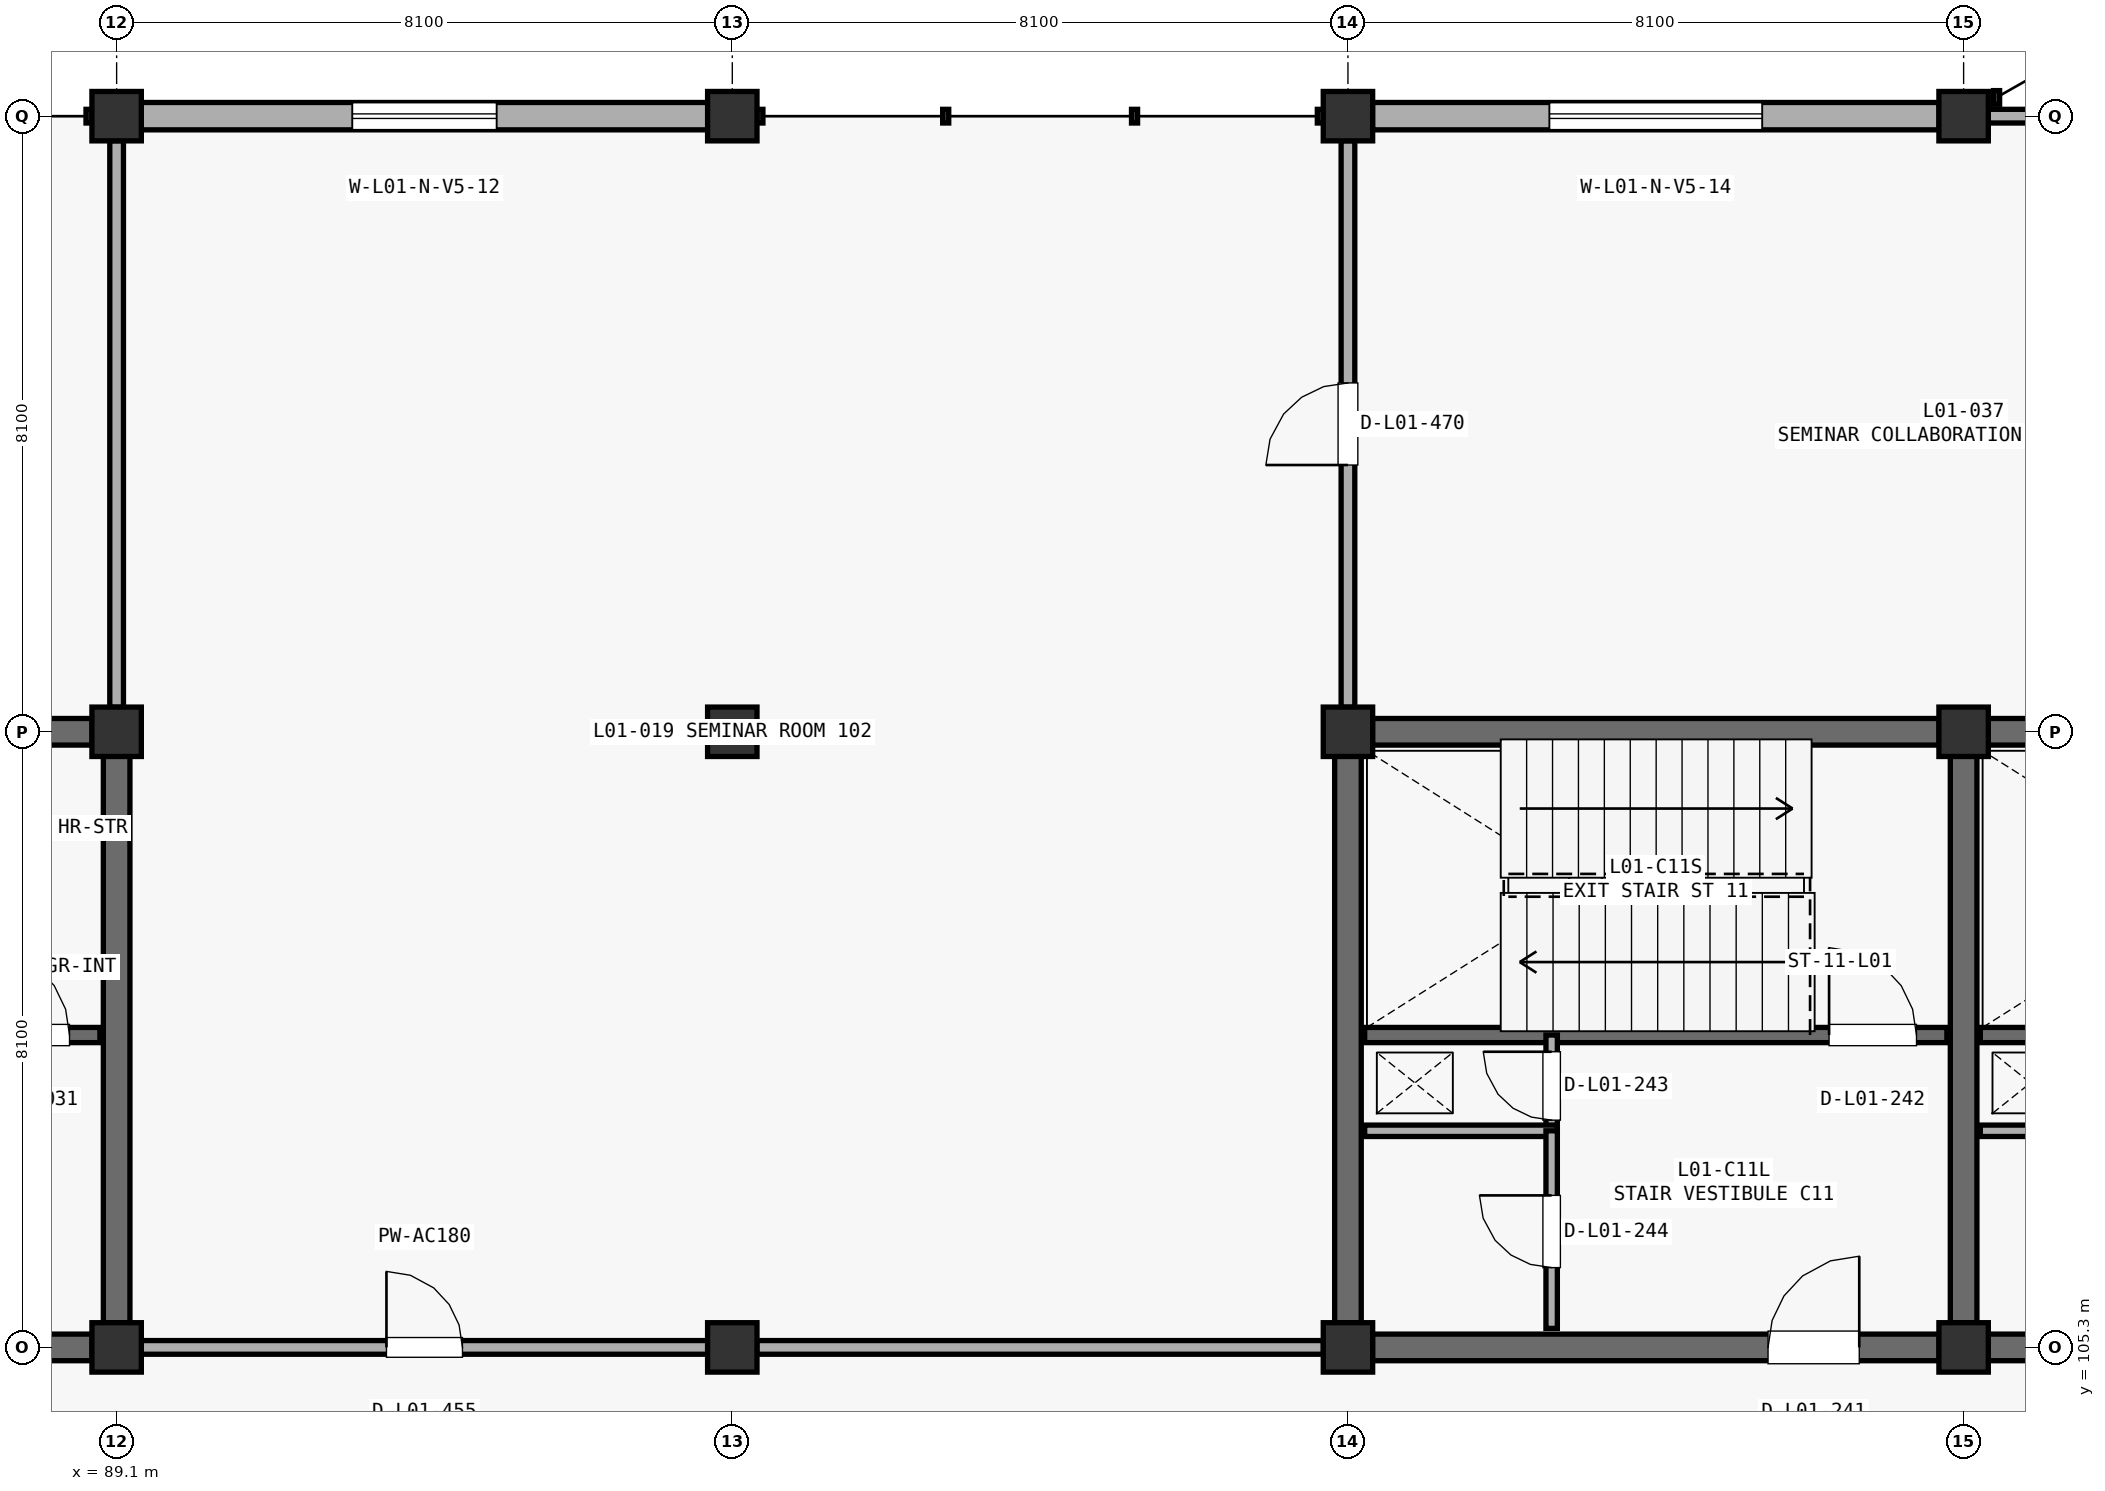
"""IFC4 building model, lengths in metres.
Left out: names, types, materials, properties, quantities, classifications, styles, units other than length and angle.
Written with IfcOpenShell. Run it as: python <this file> out.ifc"""

import sys

from ifc_helpers import new_model, si_unit, direction, frame, frame_2d, origin, origin_2d, place, context, subcontext, project, spatial, rectangle, extrude, element, fill, save


model = new_model("IFC4")
c1 = context("Model", 3, precision=1e-05, world=origin(), true_north=direction((0.0, 1.0)))
c2 = subcontext(c1, "Body", "Model", "MODEL_VIEW")
j1 = project(units=[si_unit("LENGTHUNIT", "METRE"), si_unit("PLANEANGLEUNIT", "RADIAN")], contexts=[c1])
p1 = place(None, origin())
s1 = spatial("IfcSite", under=j1, at=p1, CompositionType="ELEMENT")
p2 = place(p1, origin())
s2 = spatial("IfcBuilding", under=s1, at=p2, CompositionType="ELEMENT")
p3 = place(p2, frame((0.0, 0.0, 5.1)))
s3 = spatial("IfcBuildingStorey", under=s2, at=p3, CompositionType="ELEMENT", Elevation=5.1)
for number, where, z_axis, x_axis in (
    (1, (89.1, 105.3, 0.0), (0.0, 0.0, 1.0), (1.0, 0.0, 0.0)),
    (2, (89.1, 113.4, 0.0), (0.0, 0.0, 1.0), (1.0, 0.0, 0.0)),
    (3, (89.1, 121.5, 0.0), (0.0, 0.0, 1.0), (1.0, 0.0, 0.0)),
    (4, (97.2, 105.3, 0.0), (0.0, 0.0, 1.0), (1.0, 0.0, 0.0)),
    (5, (97.2, 113.4, 0.0), (0.0, 0.0, 1.0), (1.0, 0.0, 0.0)),
    (6, (97.2, 121.5, 0.0), (0.0, 0.0, 1.0), (1.0, 0.0, 0.0)),
    (7, (105.3, 105.3, 0.0), (0.0, 0.0, 1.0), (1.0, 0.0, 0.0)),
    (8, (105.3, 113.4, 0.0), (0.0, 0.0, 1.0), (1.0, 0.0, 0.0)),
    (9, (105.3, 121.5, 0.0), (0.0, 0.0, 1.0), (1.0, 0.0, 0.0)),
    (10, (113.4, 105.3, 0.0), (0.0, 0.0, 1.0), (1.0, 0.0, 0.0)),
    (11, (113.4, 113.4, 0.0), (0.0, 0.0, 1.0), (1.0, 0.0, 0.0)),
    (12, (113.4, 121.5, 0.0), (0.0, 0.0, 1.0), (1.0, 0.0, 0.0)),
):
    element("IfcColumn", number, at=place(p3, frame(where, z_axis=z_axis, x_axis=x_axis)), inside=s3, PredefinedType="COLUMN", context=c2, shape_type="SweptSolid", body=[
        extrude(rectangle(XDim=0.65, YDim=0.65, at=origin_2d()), origin(), (0.0, 0.0, 1.0), 4.59),
    ])
p4 = place(p3, frame((89.423, 121.5, 0.0), z_axis=(0.0, 0.0, 1.0), x_axis=(1.0, 0.0, 0.0)))
e13 = element("IfcWall", 13, at=p4, inside=s3, PredefinedType="STANDARD", context=c2, shape_type="SweptSolid", body=[
    extrude(rectangle(XDim=7.454, YDim=0.36, at=frame_2d((3.727, 0.0))), origin(), (0.0, 0.0, 1.0), 3.402),
])
p5 = place(p4, frame((2.777, 0.0, 0.85)))
e14 = element("IfcOpeningElement", 14, at=p5, cuts=e13, PredefinedType="OPENING", context=c2, shape_type="SweptSolid", body=[
    extrude(rectangle(XDim=1.9, YDim=1.85, at=frame_2d((0.95, 0.925))), frame((0.0, 0.19, 0.0), z_axis=(0.0, -1.0, 0.0), x_axis=(1.0, 0.0, 0.0)), (0.0, 0.0, 1.0), 0.38),
])
p6 = place(p3, frame((105.623, 121.5, 0.0), z_axis=(0.0, 0.0, 1.0), x_axis=(1.0, 0.0, 0.0)))
e15 = element("IfcWall", 15, at=p6, inside=s3, PredefinedType="STANDARD", context=c2, shape_type="SweptSolid", body=[
    extrude(rectangle(XDim=7.454, YDim=0.36, at=frame_2d((3.727, 0.0))), origin(), (0.0, 0.0, 1.0), 3.502),
])
p7 = place(p6, frame((2.327, 0.0, 0.85)))
e16 = element("IfcOpeningElement", 16, at=p7, cuts=e15, PredefinedType="OPENING", context=c2, shape_type="SweptSolid", body=[
    extrude(rectangle(XDim=2.8, YDim=1.85, at=frame_2d((1.4, 0.925))), frame((0.0, 0.19, 0.0), z_axis=(0.0, -1.0, 0.0), x_axis=(1.0, 0.0, 0.0)), (0.0, 0.0, 1.0), 0.38),
])
p8 = place(p3, frame((81.323, 113.4, 0.0), z_axis=(0.0, 0.0, 1.0), x_axis=(1.0, 0.0, 0.0)))
e17 = element("IfcWall", 17, at=p8, inside=s3, PredefinedType="SHEAR", context=c2, shape_type="SweptSolid", body=[
    extrude(rectangle(XDim=7.454, YDim=0.35, at=frame_2d((3.727, 0.0))), origin(), (0.0, 0.0, 1.0), 4.252),
])
p9 = place(p3, frame((89.1, 105.623, 0.0), z_axis=(0.0, 0.0, 1.0), x_axis=(0.0, 1.0, 0.0)))
e18 = element("IfcWall", 18, at=p9, inside=s3, PredefinedType="SHEAR", context=c2, shape_type="SweptSolid", body=[
    extrude(rectangle(XDim=7.454, YDim=0.35, at=frame_2d((3.727, 0.0))), origin(), (0.0, 0.0, 1.0), 4.252),
])
p10 = place(p3, frame((81.323, 105.3, 0.0), z_axis=(0.0, 0.0, 1.0), x_axis=(1.0, 0.0, 0.0)))
e19 = element("IfcWall", 19, at=p10, inside=s3, PredefinedType="SHEAR", context=c2, shape_type="SweptSolid", body=[
    extrude(rectangle(XDim=7.454, YDim=0.35, at=frame_2d((3.727, 0.0))), origin(), (0.0, 0.0, 1.0), 4.252),
])
p11 = place(p10, frame((5.204, 0.0, 0.0)))
e20 = element("IfcOpeningElement", 20, at=p11, cuts=e19, PredefinedType="OPENING", context=c2, shape_type="SweptSolid", body=[
    extrude(rectangle(XDim=1.2, YDim=2.2, at=frame_2d((0.6, 1.1))), frame((0.0, 0.185, 0.0), z_axis=(0.0, -1.0, 0.0), x_axis=(1.0, 0.0, 0.0)), (0.0, 0.0, 1.0), 0.37),
])
p12 = place(p3, frame((81.22, 109.41, 0.0), z_axis=(0.0, 0.0, 1.0), x_axis=(1.0, 0.0, 0.0)))
e21 = element("IfcWall", 21, at=p12, inside=s3, PredefinedType="SHEAR", context=c2, shape_type="SweptSolid", body=[
    extrude(rectangle(XDim=7.66, YDim=0.2, at=frame_2d((3.83, 0.0))), origin(), (0.0, 0.0, 1.0), 4.252),
])
p13 = place(p12, frame((6.11, 0.0, 0.0)))
e22 = element("IfcOpeningElement", 22, at=p13, cuts=e21, PredefinedType="OPENING", context=c2, shape_type="SweptSolid", body=[
    extrude(rectangle(XDim=1.15, YDim=2.2, at=frame_2d((0.575, 1.1))), frame((0.0, 0.11, 0.0), z_axis=(0.0, -1.0, 0.0), x_axis=(1.0, 0.0, 0.0)), (0.0, 0.0, 1.0), 0.22),
])
p14 = place(p3, frame((113.723, 113.4, 0.0), z_axis=(0.0, 0.0, 1.0), x_axis=(1.0, 0.0, 0.0)))
e23 = element("IfcWall", 23, at=p14, inside=s3, PredefinedType="SHEAR", context=c2, shape_type="SweptSolid", body=[
    extrude(rectangle(XDim=7.454, YDim=0.35, at=frame_2d((3.727, 0.0))), origin(), (0.0, 0.0, 1.0), 4.252),
])
p15 = place(p3, frame((113.4, 105.623, 0.0), z_axis=(0.0, 0.0, 1.0), x_axis=(0.0, 1.0, 0.0)))
e24 = element("IfcWall", 24, at=p15, inside=s3, PredefinedType="SHEAR", context=c2, shape_type="SweptSolid", body=[
    extrude(rectangle(XDim=7.454, YDim=0.35, at=frame_2d((3.727, 0.0))), origin(), (0.0, 0.0, 1.0), 4.252),
])
p16 = place(p3, frame((113.723, 105.3, 0.0), z_axis=(0.0, 0.0, 1.0), x_axis=(1.0, 0.0, 0.0)))
e25 = element("IfcWall", 25, at=p16, inside=s3, PredefinedType="SHEAR", context=c2, shape_type="SweptSolid", body=[
    extrude(rectangle(XDim=7.454, YDim=0.35, at=frame_2d((3.727, 0.0))), origin(), (0.0, 0.0, 1.0), 4.252),
])
p17 = place(p16, frame((5.204, 0.0, 0.0)))
e26 = element("IfcOpeningElement", 26, at=p17, cuts=e25, PredefinedType="OPENING", context=c2, shape_type="SweptSolid", body=[
    extrude(rectangle(XDim=1.2, YDim=2.2, at=frame_2d((0.6, 1.1))), frame((0.0, 0.185, 0.0), z_axis=(0.0, -1.0, 0.0), x_axis=(1.0, 0.0, 0.0)), (0.0, 0.0, 1.0), 0.37),
])
p18 = place(p3, frame((113.62, 109.41, 0.0), z_axis=(0.0, 0.0, 1.0), x_axis=(1.0, 0.0, 0.0)))
e27 = element("IfcWall", 27, at=p18, inside=s3, PredefinedType="SHEAR", context=c2, shape_type="SweptSolid", body=[
    extrude(rectangle(XDim=7.66, YDim=0.2, at=frame_2d((3.83, 0.0))), origin(), (0.0, 0.0, 1.0), 4.252),
])
p19 = place(p18, frame((6.11, 0.0, 0.0)))
e28 = element("IfcOpeningElement", 28, at=p19, cuts=e27, PredefinedType="OPENING", context=c2, shape_type="SweptSolid", body=[
    extrude(rectangle(XDim=1.15, YDim=2.2, at=frame_2d((0.575, 1.1))), frame((0.0, 0.11, 0.0), z_axis=(0.0, -1.0, 0.0), x_axis=(1.0, 0.0, 0.0)), (0.0, 0.0, 1.0), 0.22),
])
p20 = place(p3, frame((113.62, 108.15, 0.0), z_axis=(0.0, 0.0, 1.0), x_axis=(1.0, 0.0, 0.0)))
e29 = element("IfcWall", 29, at=p20, inside=s3, PredefinedType="PARTITIONING", context=c2, shape_type="SweptSolid", body=[
    extrude(rectangle(XDim=2.53, YDim=0.15, at=frame_2d((1.265, 0.0))), origin(), (0.0, 0.0, 1.0), 4.252),
])
for number, where, z_axis, x_axis in (
    (30, (105.623, 113.4, 0.0), (0.0, 0.0, 1.0), (1.0, 0.0, 0.0)),
    (31, (105.3, 105.623, 0.0), (0.0, 0.0, 1.0), (0.0, 1.0, 0.0)),
):
    element("IfcWall", number, at=place(p3, frame(where, z_axis=z_axis, x_axis=x_axis)), inside=s3, PredefinedType="SHEAR", context=c2, shape_type="SweptSolid", body=[
        extrude(rectangle(XDim=7.454, YDim=0.35, at=frame_2d((3.727, 0.0))), origin(), (0.0, 0.0, 1.0), 4.252),
    ])
p21 = place(p3, frame((105.623, 105.3, 0.0), z_axis=(0.0, 0.0, 1.0), x_axis=(1.0, 0.0, 0.0)))
e32 = element("IfcWall", 32, at=p21, inside=s3, PredefinedType="SHEAR", context=c2, shape_type="SweptSolid", body=[
    extrude(rectangle(XDim=7.454, YDim=0.35, at=frame_2d((3.727, 0.0))), origin(), (0.0, 0.0, 1.0), 4.252),
])
p22 = place(p21, frame((5.204, 0.0, 0.0)))
e33 = element("IfcOpeningElement", 33, at=p22, cuts=e32, PredefinedType="OPENING", context=c2, shape_type="SweptSolid", body=[
    extrude(rectangle(XDim=1.2, YDim=2.2, at=frame_2d((0.6, 1.1))), frame((0.0, 0.185, 0.0), z_axis=(0.0, -1.0, 0.0), x_axis=(1.0, 0.0, 0.0)), (0.0, 0.0, 1.0), 0.37),
])
p23 = place(p3, frame((105.52, 109.41, 0.0), z_axis=(0.0, 0.0, 1.0), x_axis=(1.0, 0.0, 0.0)))
e34 = element("IfcWall", 34, at=p23, inside=s3, PredefinedType="SHEAR", context=c2, shape_type="SweptSolid", body=[
    extrude(rectangle(XDim=7.66, YDim=0.2, at=frame_2d((3.83, 0.0))), origin(), (0.0, 0.0, 1.0), 4.252),
])
p24 = place(p23, frame((6.11, 0.0, 0.0)))
e35 = element("IfcOpeningElement", 35, at=p24, cuts=e34, PredefinedType="OPENING", context=c2, shape_type="SweptSolid", body=[
    extrude(rectangle(XDim=1.15, YDim=2.2, at=frame_2d((0.575, 1.1))), frame((0.0, 0.11, 0.0), z_axis=(0.0, -1.0, 0.0), x_axis=(1.0, 0.0, 0.0)), (0.0, 0.0, 1.0), 0.22),
])
p25 = place(p3, frame((107.98, 108.15, 0.0), z_axis=(0.0, 0.0, 1.0), x_axis=(0.0, 1.0, 0.0)))
e36 = element("IfcWall", 36, at=p25, inside=s3, PredefinedType="PARTITIONING", context=c2, shape_type="SweptSolid", body=[
    extrude(rectangle(XDim=1.26, YDim=0.15, at=frame_2d((0.63, 0.0))), origin(), (0.0, 0.0, 1.0), 4.252),
])
p26 = place(p25, frame((0.14, 0.0, 0.0)))
e37 = element("IfcOpeningElement", 37, at=p26, cuts=e36, PredefinedType="OPENING", context=c2, shape_type="SweptSolid", body=[
    extrude(rectangle(XDim=0.9, YDim=2.15, at=frame_2d((0.45, 1.075))), frame((0.0, 0.085, 0.0), z_axis=(0.0, -1.0, 0.0), x_axis=(1.0, 0.0, 0.0)), (0.0, 0.0, 1.0), 0.17),
])
p27 = place(p3, frame((105.52, 108.15, 0.0), z_axis=(0.0, 0.0, 1.0), x_axis=(1.0, 0.0, 0.0)))
e38 = element("IfcWall", 38, at=p27, inside=s3, PredefinedType="PARTITIONING", context=c2, shape_type="SweptSolid", body=[
    extrude(rectangle(XDim=2.53, YDim=0.15, at=frame_2d((1.265, 0.0))), origin(), (0.0, 0.0, 1.0), 4.252),
])
p28 = place(p3, frame((107.98, 105.55, 0.0), z_axis=(0.0, 0.0, 1.0), x_axis=(0.0, 1.0, 0.0)))
e39 = element("IfcWall", 39, at=p28, inside=s3, PredefinedType="PARTITIONING", context=c2, shape_type="SweptSolid", body=[
    extrude(rectangle(XDim=2.6, YDim=0.15, at=frame_2d((1.3, 0.0))), origin(), (0.0, 0.0, 1.0), 4.252),
])
p29 = place(p28, frame((0.8, 0.0, 0.0)))
e40 = element("IfcOpeningElement", 40, at=p29, cuts=e39, PredefinedType="OPENING", context=c2, shape_type="SweptSolid", body=[
    extrude(rectangle(XDim=0.95, YDim=2.15, at=frame_2d((0.475, 1.075))), frame((0.0, 0.085, 0.0), z_axis=(0.0, -1.0, 0.0), x_axis=(1.0, 0.0, 0.0)), (0.0, 0.0, 1.0), 0.17),
])
p30 = place(p3, frame((89.423, 105.3, 0.0), z_axis=(0.0, 0.0, 1.0), x_axis=(1.0, 0.0, 0.0)))
e41 = element("IfcWall", 41, at=p30, inside=s3, PredefinedType="PARTITIONING", context=c2, shape_type="SweptSolid", body=[
    extrude(rectangle(XDim=7.454, YDim=0.18, at=frame_2d((3.727, 0.0))), origin(), (0.0, 0.0, 1.0), 3.602),
])
p31 = place(p30, frame((3.227, 0.0, 0.0)))
e42 = element("IfcOpeningElement", 42, at=p31, cuts=e41, PredefinedType="OPENING", context=c2, shape_type="SweptSolid", body=[
    extrude(rectangle(XDim=1.0, YDim=2.15, at=frame_2d((0.5, 1.075))), frame((0.0, 0.1, 0.0), z_axis=(0.0, -1.0, 0.0), x_axis=(1.0, 0.0, 0.0)), (0.0, 0.0, 1.0), 0.2),
])
p32 = place(p3, frame((97.523, 105.3, 0.0), z_axis=(0.0, 0.0, 1.0), x_axis=(1.0, 0.0, 0.0)))
e43 = element("IfcWall", 43, at=p32, inside=s3, PredefinedType="PARTITIONING", context=c2, shape_type="SweptSolid", body=[
    extrude(rectangle(XDim=7.454, YDim=0.18, at=frame_2d((3.727, 0.0))), origin(), (0.0, 0.0, 1.0), 3.652),
])
p33 = place(p3, frame((105.3, 113.723, 0.0), z_axis=(0.0, 0.0, 1.0), x_axis=(0.0, 1.0, 0.0)))
e44 = element("IfcWall", 44, at=p33, inside=s3, PredefinedType="PARTITIONING", context=c2, shape_type="SweptSolid", body=[
    extrude(rectangle(XDim=7.454, YDim=0.18, at=frame_2d((3.727, 0.0))), origin(), (0.0, 0.0, 1.0), 3.652),
])
p34 = place(p33, frame((3.187, 0.0, 0.0)))
e45 = element("IfcOpeningElement", 45, at=p34, cuts=e44, PredefinedType="OPENING", context=c2, shape_type="SweptSolid", body=[
    extrude(rectangle(XDim=1.08, YDim=2.15, at=frame_2d((0.54, 1.075))), frame((0.0, 0.1, 0.0), z_axis=(0.0, -1.0, 0.0), x_axis=(1.0, 0.0, 0.0)), (0.0, 0.0, 1.0), 0.2),
])
p35 = place(p3, frame((89.1, 113.723, 0.0), z_axis=(0.0, 0.0, 1.0), x_axis=(0.0, 1.0, 0.0)))
e46 = element("IfcWall", 46, at=p35, inside=s3, PredefinedType="PARTITIONING", context=c2, shape_type="SweptSolid", body=[
    extrude(rectangle(XDim=7.454, YDim=0.18, at=frame_2d((3.727, 0.0))), origin(), (0.0, 0.0, 1.0), 3.402),
])
p36 = place(p3, frame((113.723, 121.5, 0.0), z_axis=(0.0, 0.0, 1.0), x_axis=(1.0, 0.0, 0.0)))
e47 = element("IfcWall", 47, at=p36, inside=s3, PredefinedType="PARTITIONING", context=c2, shape_type="SweptSolid", body=[
    extrude(rectangle(XDim=7.454, YDim=0.18, at=frame_2d((3.727, 0.0))), origin(), (0.0, 0.0, 1.0), 3.602),
])
p37 = place(p5, origin())
e48 = element("IfcWindow", 48, at=p37, inside=s3, PartitioningType="SINGLE_PANEL", PredefinedType="WINDOW", context=c2, shape_type="SweptSolid", body=[
    extrude(rectangle(XDim=1.9, YDim=1.85, at=frame_2d((0.95, 0.925))), frame((0.0, 0.03, 0.0), z_axis=(0.0, -1.0, 0.0), x_axis=(1.0, 0.0, 0.0)), (0.0, 0.0, 1.0), 0.06),
])
fill(e14, e48)
p38 = place(p7, origin())
e49 = element("IfcWindow", 49, at=p38, inside=s3, PartitioningType="SINGLE_PANEL", PredefinedType="WINDOW", context=c2, shape_type="SweptSolid", body=[
    extrude(rectangle(XDim=2.8, YDim=1.85, at=frame_2d((1.4, 0.925))), frame((0.0, 0.03, 0.0), z_axis=(0.0, -1.0, 0.0), x_axis=(1.0, 0.0, 0.0)), (0.0, 0.0, 1.0), 0.06),
])
fill(e16, e49)
p39 = place(p13, origin())
e50 = element("IfcDoor", 50, at=p39, inside=s3, OperationType="SINGLE_SWING_LEFT", PredefinedType="DOOR", context=c2, shape_type="SweptSolid", body=[
    extrude(rectangle(XDim=1.15, YDim=2.2, at=frame_2d((0.575, 1.1))), frame((0.0, 0.025, 0.0), z_axis=(0.0, -1.0, 0.0), x_axis=(1.0, 0.0, 0.0)), (0.0, 0.0, 1.0), 0.05),
])
fill(e22, e50)
p40 = place(p22, origin())
e51 = element("IfcDoor", 51, at=p40, inside=s3, OperationType="SINGLE_SWING_RIGHT", PredefinedType="DOOR", context=c2, shape_type="SweptSolid", body=[
    extrude(rectangle(XDim=1.2, YDim=2.2, at=frame_2d((0.6, 1.1))), frame((0.0, 0.025, 0.0), z_axis=(0.0, -1.0, 0.0), x_axis=(1.0, 0.0, 0.0)), (0.0, 0.0, 1.0), 0.05),
])
fill(e33, e51)
p41 = place(p24, origin())
e52 = element("IfcDoor", 52, at=p41, inside=s3, OperationType="SINGLE_SWING_LEFT", PredefinedType="DOOR", context=c2, shape_type="SweptSolid", body=[
    extrude(rectangle(XDim=1.15, YDim=2.2, at=frame_2d((0.575, 1.1))), frame((0.0, 0.025, 0.0), z_axis=(0.0, -1.0, 0.0), x_axis=(1.0, 0.0, 0.0)), (0.0, 0.0, 1.0), 0.05),
])
fill(e35, e52)
p42 = place(p26, origin())
e53 = element("IfcDoor", 53, at=p42, inside=s3, OperationType="SINGLE_SWING_RIGHT", PredefinedType="DOOR", context=c2, shape_type="SweptSolid", body=[
    extrude(rectangle(XDim=0.9, YDim=2.15, at=frame_2d((0.45, 1.075))), frame((0.0, 0.025, 0.0), z_axis=(0.0, -1.0, 0.0), x_axis=(1.0, 0.0, 0.0)), (0.0, 0.0, 1.0), 0.05),
])
fill(e37, e53)
p43 = place(p29, origin())
e54 = element("IfcDoor", 54, at=p43, inside=s3, OperationType="SINGLE_SWING_RIGHT", PredefinedType="DOOR", context=c2, shape_type="SweptSolid", body=[
    extrude(rectangle(XDim=0.95, YDim=2.15, at=frame_2d((0.475, 1.075))), frame((0.0, 0.025, 0.0), z_axis=(0.0, -1.0, 0.0), x_axis=(1.0, 0.0, 0.0)), (0.0, 0.0, 1.0), 0.05),
])
fill(e40, e54)
p44 = place(p31, origin())
e55 = element("IfcDoor", 55, at=p44, inside=s3, OperationType="SINGLE_SWING_LEFT", PredefinedType="DOOR", context=c2, shape_type="SweptSolid", body=[
    extrude(rectangle(XDim=1.0, YDim=2.15, at=frame_2d((0.5, 1.075))), frame((0.0, 0.025, 0.0), z_axis=(0.0, -1.0, 0.0), x_axis=(1.0, 0.0, 0.0)), (0.0, 0.0, 1.0), 0.05),
])
fill(e42, e55)
p45 = place(p34, origin())
e56 = element("IfcDoor", 56, at=p45, inside=s3, OperationType="SINGLE_SWING_LEFT", PredefinedType="DOOR", context=c2, shape_type="SweptSolid", body=[
    extrude(rectangle(XDim=1.08, YDim=2.15, at=frame_2d((0.54, 1.075))), frame((0.0, 0.025, 0.0), z_axis=(0.0, -1.0, 0.0), x_axis=(1.0, 0.0, 0.0)), (0.0, 0.0, 1.0), 0.05),
])
fill(e45, e56)
save(model, sys.argv[1])
